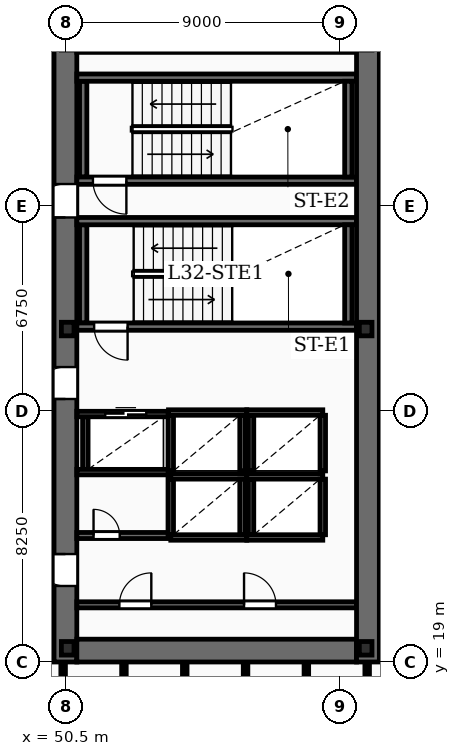
"""IFC4 building model, lengths in metres.
Left out: names, types, materials, properties, quantities, classifications, styles, units other than length and angle.
Written with IfcOpenShell. Run it as: python <this file> out.ifc"""

import sys

from ifc_helpers import new_model, si_unit, direction, frame, frame_2d, origin, origin_2d, place, context, subcontext, project, spatial, rectangle, i_section, extrude, element, fill, save


model = new_model("IFC4")
c1 = context("Model", 3, precision=1e-05, world=origin(), true_north=direction((0.0, 1.0)))
c2 = subcontext(c1, "Body", "Model", "MODEL_VIEW")
j1 = project(units=[si_unit("LENGTHUNIT", "METRE"), si_unit("PLANEANGLEUNIT", "RADIAN")], contexts=[c1])
p1 = place(None, origin())
s1 = spatial("IfcSite", under=j1, at=p1, CompositionType="ELEMENT")
p2 = place(p1, origin())
s2 = spatial("IfcBuilding", under=s1, at=p2, CompositionType="ELEMENT")
p3 = place(p2, frame((0.0, 0.0, 138.25)))
s3 = spatial("IfcBuildingStorey", under=s2, at=p3, CompositionType="ELEMENT", Elevation=138.25)
p4 = place(p3, frame((50.475, 19.0, -0.27), z_axis=(0.0, 0.0, 1.0), x_axis=(0.0, 1.0, 0.0)))
e1 = element("IfcWall", 1, at=p4, inside=s3, PredefinedType="SHEAR", context=c2, shape_type="SweptSolid", body=[
    extrude(rectangle(XDim=20.8, YDim=0.75, at=frame_2d((10.4, 0.0))), origin(), (0.0, 0.0, 1.0), 3.75),
])
p5 = place(p4, frame((2.5, 0.0, 0.27)))
e2 = element("IfcOpeningElement", 2, at=p5, cuts=e1, PredefinedType="OPENING", context=c2, shape_type="SweptSolid", body=[
    extrude(rectangle(XDim=1.05, YDim=2.15, at=frame_2d((0.525, 1.075))), frame((0.0, 0.385, 0.0), z_axis=(0.0, -1.0, 0.0), x_axis=(1.0, 0.0, 0.0)), (0.0, 0.0, 1.0), 0.77),
])
p6 = place(p4, frame((8.65, 0.0, 0.27)))
e3 = element("IfcOpeningElement", 3, at=p6, cuts=e1, PredefinedType="OPENING", context=c2, shape_type="SweptSolid", body=[
    extrude(rectangle(XDim=1.05, YDim=2.15, at=frame_2d((0.525, 1.075))), frame((0.0, 0.385, 0.0), z_axis=(0.0, -1.0, 0.0), x_axis=(1.0, 0.0, 0.0)), (0.0, 0.0, 1.0), 0.77),
])
p7 = place(p4, frame((14.62, 0.0, 0.27)))
e4 = element("IfcOpeningElement", 4, at=p7, cuts=e1, PredefinedType="OPENING", context=c2, shape_type="SweptSolid", body=[
    extrude(rectangle(XDim=1.1, YDim=2.15, at=frame_2d((0.55, 1.075))), frame((0.0, 0.385, 0.0), z_axis=(0.0, -1.0, 0.0), x_axis=(1.0, 0.0, 0.0)), (0.0, 0.0, 1.0), 0.77),
])
p8 = place(p3, frame((60.425, 19.0, -0.27), z_axis=(0.0, 0.0, 1.0), x_axis=(0.0, 1.0, 0.0)))
e5 = element("IfcWall", 5, at=p8, inside=s3, PredefinedType="SHEAR", context=c2, shape_type="SweptSolid", body=[
    extrude(rectangle(XDim=20.8, YDim=0.75, at=frame_2d((10.4, 0.0))), origin(), (0.0, 0.0, 1.0), 3.75),
])
for number, where, z_axis, x_axis in (
    (6, (50.85, 19.375, -0.27), (0.0, 0.0, 1.0), (1.0, 0.0, 0.0)),
    (7, (50.85, 39.425, -0.27), (0.0, 0.0, 1.0), (1.0, 0.0, 0.0)),
):
    element("IfcWall", number, at=place(p3, frame(where, z_axis=z_axis, x_axis=x_axis)), inside=s3, PredefinedType="SHEAR", context=c2, shape_type="SweptSolid", body=[
        extrude(rectangle(XDim=9.2, YDim=0.75, at=frame_2d((4.6, 0.0))), origin(), (0.0, 0.0, 1.0), 3.75),
    ])
for number, where, z_axis, x_axis in (
    (8, (50.55, 19.45, -0.27), (0.0, 0.0, 1.0), (1.0, 0.0, 0.0)),
    (9, (60.35, 19.45, -0.27), (0.0, 0.0, 1.0), (1.0, 0.0, 0.0)),
    (10, (50.55, 29.95, -0.27), (0.0, 0.0, 1.0), (1.0, 0.0, 0.0)),
    (11, (60.35, 29.95, -0.27), (0.0, 0.0, 1.0), (1.0, 0.0, 0.0)),
):
    element("IfcColumn", number, at=place(p3, frame(where, z_axis=z_axis, x_axis=x_axis)), inside=s3, PredefinedType="COLUMN", context=c2, shape_type="SweptSolid", body=[
        extrude(i_section(OverallWidth=0.416, OverallDepth=0.446, WebThickness=0.039, FlangeThickness=0.063, FilletRadius=0.02, at=origin_2d()), origin(), (0.0, 0.0, 1.0), 3.75),
    ])
p9 = place(p3, frame((60.05, 30.03, 0.0), z_axis=(0.0, 0.0, 1.0), x_axis=(-1.0, 0.0, 0.0)))
e12 = element("IfcWall", 12, at=p9, inside=s3, PredefinedType="SOLIDWALL", context=c2, shape_type="SweptSolid", body=[
    extrude(rectangle(XDim=9.2, YDim=0.24, at=frame_2d((4.6, 0.0))), origin(), (0.0, 0.0, 1.0), 3.48),
])
p10 = place(p9, frame((7.53, 0.0, 0.0)))
e13 = element("IfcOpeningElement", 13, at=p10, cuts=e12, PredefinedType="OPENING", context=c2, shape_type="SweptSolid", body=[
    extrude(rectangle(XDim=1.1, YDim=2.15, at=frame_2d((0.55, 1.075))), frame((0.0, 0.13, 0.0), z_axis=(0.0, -1.0, 0.0), x_axis=(1.0, 0.0, 0.0)), (0.0, 0.0, 1.0), 0.26),
])
p11 = place(p3, frame((50.85, 33.5, 0.0), z_axis=(0.0, 0.0, 1.0), x_axis=(1.0, 0.0, 0.0)))
e14 = element("IfcWall", 14, at=p11, inside=s3, PredefinedType="SOLIDWALL", context=c2, shape_type="SweptSolid", body=[
    extrude(rectangle(XDim=9.2, YDim=0.24, at=frame_2d((4.6, 0.0))), origin(), (0.0, 0.0, 1.0), 3.48),
])
for number, where, z_axis, x_axis in (
    (15, (51.06, 30.15, 0.0), (0.0, 0.0, 1.0), (0.0, 1.0, 0.0)),
    (16, (59.78, 30.15, 0.0), (0.0, 0.0, 1.0), (0.0, 1.0, 0.0)),
):
    element("IfcWall", number, at=place(p3, frame(where, z_axis=z_axis, x_axis=x_axis)), inside=s3, PredefinedType="SOLIDWALL", context=c2, shape_type="SweptSolid", body=[
        extrude(rectangle(XDim=3.23, YDim=0.24, at=frame_2d((1.615, 0.0))), origin(), (0.0, 0.0, 1.0), 3.48),
    ])
p12 = place(p3, frame((60.05, 34.83, 0.0), z_axis=(0.0, 0.0, 1.0), x_axis=(-1.0, 0.0, 0.0)))
e17 = element("IfcWall", 17, at=p12, inside=s3, PredefinedType="SOLIDWALL", context=c2, shape_type="SweptSolid", body=[
    extrude(rectangle(XDim=9.2, YDim=0.24, at=frame_2d((4.6, 0.0))), origin(), (0.0, 0.0, 1.0), 3.48),
])
p13 = place(p12, frame((7.57, 0.0, 0.0)))
e18 = element("IfcOpeningElement", 18, at=p13, cuts=e17, PredefinedType="OPENING", context=c2, shape_type="SweptSolid", body=[
    extrude(rectangle(XDim=1.1, YDim=2.15, at=frame_2d((0.55, 1.075))), frame((0.0, 0.13, 0.0), z_axis=(0.0, -1.0, 0.0), x_axis=(1.0, 0.0, 0.0)), (0.0, 0.0, 1.0), 0.26),
])
p14 = place(p3, frame((50.85, 38.22, 0.0), z_axis=(0.0, 0.0, 1.0), x_axis=(1.0, 0.0, 0.0)))
e19 = element("IfcWall", 19, at=p14, inside=s3, PredefinedType="SOLIDWALL", context=c2, shape_type="SweptSolid", body=[
    extrude(rectangle(XDim=9.2, YDim=0.24, at=frame_2d((4.6, 0.0))), origin(), (0.0, 0.0, 1.0), 3.48),
])
for number, where, z_axis, x_axis in (
    (20, (51.06, 34.95, 0.0), (0.0, 0.0, 1.0), (0.0, 1.0, 0.0)),
    (21, (59.78, 34.95, 0.0), (0.0, 0.0, 1.0), (0.0, 1.0, 0.0)),
):
    element("IfcWall", number, at=place(p3, frame(where, z_axis=z_axis, x_axis=x_axis)), inside=s3, PredefinedType="SOLIDWALL", context=c2, shape_type="SweptSolid", body=[
        extrude(rectangle(XDim=3.15, YDim=0.24, at=frame_2d((1.575, 0.0))), origin(), (0.0, 0.0, 1.0), 3.48),
    ])
for number, where, z_axis, x_axis in (
    (22, (53.94, 25.105, 0.0), (0.0, 0.0, 1.0), (1.0, 0.0, 0.0)),
    (23, (53.94, 23.095, 0.0), (0.0, 0.0, 1.0), (1.0, 0.0, 0.0)),
):
    element("IfcWall", number, at=place(p3, frame(where, z_axis=z_axis, x_axis=x_axis)), inside=s3, PredefinedType="SOLIDWALL", context=c2, shape_type="SweptSolid", body=[
        extrude(rectangle(XDim=2.5, YDim=0.18, at=frame_2d((1.25, 0.0))), origin(), (0.0, 0.0, 1.0), 3.48),
    ])
for number, where, z_axis, x_axis in (
    (24, (53.94, 23.185, 0.0), (0.0, 0.0, 1.0), (0.0, 1.0, 0.0)),
    (25, (56.3, 23.185, 0.0), (0.0, 0.0, 1.0), (0.0, 1.0, 0.0)),
):
    element("IfcWall", number, at=place(p3, frame(where, z_axis=z_axis, x_axis=x_axis)), inside=s3, PredefinedType="SOLIDWALL", context=c2, shape_type="SweptSolid", body=[
        extrude(rectangle(XDim=1.83, YDim=0.18, at=frame_2d((0.915, 0.0))), origin(), (0.0, 0.0, 1.0), 3.48),
    ])
for number, where, z_axis, x_axis in (
    (26, (56.44, 25.105, 0.0), (0.0, 0.0, 1.0), (1.0, 0.0, 0.0)),
    (27, (56.44, 23.095, 0.0), (0.0, 0.0, 1.0), (1.0, 0.0, 0.0)),
):
    element("IfcWall", number, at=place(p3, frame(where, z_axis=z_axis, x_axis=x_axis)), inside=s3, PredefinedType="SOLIDWALL", context=c2, shape_type="SweptSolid", body=[
        extrude(rectangle(XDim=2.5, YDim=0.18, at=frame_2d((1.25, 0.0))), origin(), (0.0, 0.0, 1.0), 3.48),
    ])
for number, where, z_axis, x_axis in (
    (28, (56.58, 23.185, 0.0), (0.0, 0.0, 1.0), (0.0, 1.0, 0.0)),
    (29, (58.94, 23.185, 0.0), (0.0, 0.0, 1.0), (0.0, 1.0, 0.0)),
):
    element("IfcWall", number, at=place(p3, frame(where, z_axis=z_axis, x_axis=x_axis)), inside=s3, PredefinedType="SOLIDWALL", context=c2, shape_type="SweptSolid", body=[
        extrude(rectangle(XDim=1.83, YDim=0.18, at=frame_2d((0.915, 0.0))), origin(), (0.0, 0.0, 1.0), 3.48),
    ])
p15 = place(p3, frame((53.865, 27.205, 0.0), z_axis=(0.0, 0.0, 1.0), x_axis=(1.0, 0.0, 0.0)))
e30 = element("IfcWall", 30, at=p15, inside=s3, PredefinedType="SOLIDWALL", context=c2, shape_type="SweptSolid", body=[
    extrude(rectangle(XDim=2.575, YDim=0.18, at=frame_2d((1.288, 0.0))), origin(), (0.0, 0.0, 1.0), 3.48),
])
for number, where, z_axis, x_axis in (
    (31, (53.94, 25.285, 0.0), (0.0, 0.0, 1.0), (0.0, 1.0, 0.0)),
    (32, (56.3, 25.285, 0.0), (0.0, 0.0, 1.0), (0.0, 1.0, 0.0)),
):
    element("IfcWall", number, at=place(p3, frame(where, z_axis=z_axis, x_axis=x_axis)), inside=s3, PredefinedType="SOLIDWALL", context=c2, shape_type="SweptSolid", body=[
        extrude(rectangle(XDim=1.83, YDim=0.18, at=frame_2d((0.915, 0.0))), origin(), (0.0, 0.0, 1.0), 3.48),
    ])
p16 = place(p3, frame((56.44, 27.205, 0.0), z_axis=(0.0, 0.0, 1.0), x_axis=(1.0, 0.0, 0.0)))
e33 = element("IfcWall", 33, at=p16, inside=s3, PredefinedType="SOLIDWALL", context=c2, shape_type="SweptSolid", body=[
    extrude(rectangle(XDim=2.5, YDim=0.18, at=frame_2d((1.25, 0.0))), origin(), (0.0, 0.0, 1.0), 3.48),
])
for number, where, z_axis, x_axis in (
    (34, (56.58, 25.285, 0.0), (0.0, 0.0, 1.0), (0.0, 1.0, 0.0)),
    (35, (58.94, 25.285, 0.0), (0.0, 0.0, 1.0), (0.0, 1.0, 0.0)),
):
    element("IfcWall", number, at=place(p3, frame(where, z_axis=z_axis, x_axis=x_axis)), inside=s3, PredefinedType="SOLIDWALL", context=c2, shape_type="SweptSolid", body=[
        extrude(rectangle(XDim=1.83, YDim=0.18, at=frame_2d((0.915, 0.0))), origin(), (0.0, 0.0, 1.0), 3.48),
    ])
p17 = place(p3, frame((50.85, 27.155, 0.0), z_axis=(0.0, 0.0, 1.0), x_axis=(1.0, 0.0, 0.0)))
e36 = element("IfcWall", 36, at=p17, inside=s3, PredefinedType="SOLIDWALL", context=c2, shape_type="SweptSolid", body=[
    extrude(rectangle(XDim=3.015, YDim=0.18, at=frame_2d((1.507, 0.0))), origin(), (0.0, 0.0, 1.0), 3.48),
])
p18 = place(p17, frame((0.935, 0.0, 0.0)))
e37 = element("IfcOpeningElement", 37, at=p18, cuts=e36, PredefinedType="OPENING", context=c2, shape_type="SweptSolid", body=[
    extrude(rectangle(XDim=1.35, YDim=2.3, at=frame_2d((0.675, 1.15))), frame((0.0, 0.1, 0.0), z_axis=(0.0, -1.0, 0.0), x_axis=(1.0, 0.0, 0.0)), (0.0, 0.0, 1.0), 0.2),
])
p19 = place(p3, frame((50.85, 25.245, 0.0), z_axis=(0.0, 0.0, 1.0), x_axis=(1.0, 0.0, 0.0)))
e38 = element("IfcWall", 38, at=p19, inside=s3, PredefinedType="SOLIDWALL", context=c2, shape_type="SweptSolid", body=[
    extrude(rectangle(XDim=3.015, YDim=0.18, at=frame_2d((1.507, 0.0))), origin(), (0.0, 0.0, 1.0), 3.48),
])
p20 = place(p3, frame((51.13, 25.335, 0.0), z_axis=(0.0, 0.0, 1.0), x_axis=(0.0, 1.0, 0.0)))
e39 = element("IfcWall", 39, at=p20, inside=s3, PredefinedType="SOLIDWALL", context=c2, shape_type="SweptSolid", body=[
    extrude(rectangle(XDim=1.73, YDim=0.18, at=frame_2d((0.865, 0.0))), origin(), (0.0, 0.0, 1.0), 3.48),
])
p21 = place(p3, frame((50.85, 20.88, 0.0), z_axis=(0.0, 0.0, 1.0), x_axis=(1.0, 0.0, 0.0)))
e40 = element("IfcWall", 40, at=p21, inside=s3, PredefinedType="SOLIDWALL", context=c2, shape_type="SweptSolid", body=[
    extrude(rectangle(XDim=9.2, YDim=0.2, at=frame_2d((4.6, 0.0))), origin(), (0.0, 0.0, 1.0), 2.54),
])
p22 = place(p21, frame((1.4, 0.0, 0.0)))
e41 = element("IfcOpeningElement", 41, at=p22, cuts=e40, PredefinedType="OPENING", context=c2, shape_type="SweptSolid", body=[
    extrude(rectangle(XDim=1.05, YDim=2.15, at=frame_2d((0.525, 1.075))), frame((0.0, 0.11, 0.0), z_axis=(0.0, -1.0, 0.0), x_axis=(1.0, 0.0, 0.0)), (0.0, 0.0, 1.0), 0.22),
])
p23 = place(p21, frame((5.5, 0.0, 0.0)))
e42 = element("IfcOpeningElement", 42, at=p23, cuts=e40, PredefinedType="OPENING", context=c2, shape_type="SweptSolid", body=[
    extrude(rectangle(XDim=1.05, YDim=2.15, at=frame_2d((0.525, 1.075))), frame((0.0, 0.11, 0.0), z_axis=(0.0, -1.0, 0.0), x_axis=(1.0, 0.0, 0.0)), (0.0, 0.0, 1.0), 0.22),
])
p24 = place(p3, frame((50.85, 23.16, 0.0), z_axis=(0.0, 0.0, 1.0), x_axis=(1.0, 0.0, 0.0)))
e43 = element("IfcWall", 43, at=p24, inside=s3, PredefinedType="SOLIDWALL", context=c2, shape_type="SweptSolid", body=[
    extrude(rectangle(XDim=3.03, YDim=0.2, at=frame_2d((1.515, 0.0))), origin(), (0.0, 0.0, 1.0), 2.54),
])
p25 = place(p24, frame((0.55, 0.0, 0.0)))
e44 = element("IfcOpeningElement", 44, at=p25, cuts=e43, PredefinedType="OPENING", context=c2, shape_type="SweptSolid", body=[
    extrude(rectangle(XDim=0.86, YDim=2.05, at=frame_2d((0.43, 1.025))), frame((0.0, 0.11, 0.0), z_axis=(0.0, -1.0, 0.0), x_axis=(1.0, 0.0, 0.0)), (0.0, 0.0, 1.0), 0.22),
])
for number, where, z_axis, x_axis in (
    (45, (52.4, 15.4, 0.0), (0.0, 0.0, 1.0), (0.0, 1.0, 0.0)),
    (46, (54.4, 15.4, 0.0), (0.0, 0.0, 1.0), (0.0, 1.0, 0.0)),
    (47, (56.4, 15.4, 0.0), (0.0, 0.0, 1.0), (0.0, 1.0, 0.0)),
    (48, (58.4, 15.4, 0.0), (0.0, 0.0, 1.0), (0.0, 1.0, 0.0)),
    (49, (50.4, 15.4, 0.0), (0.0, 0.0, 1.0), (0.0, 1.0, 0.0)),
    (50, (60.4, 15.4, 0.0), (0.0, 0.0, 1.0), (0.0, 1.0, 0.0)),
):
    element("IfcWall", number, at=place(p3, frame(where, z_axis=z_axis, x_axis=x_axis)), inside=s3, PredefinedType="PARTITIONING", context=c2, shape_type="SweptSolid", body=[
        extrude(rectangle(XDim=3.58, YDim=0.15, at=frame_2d((1.79, 0.0))), origin(), (0.0, 0.0, 1.0), 2.54),
    ])
p26 = place(p3, frame((24.82, 38.42, 0.0), z_axis=(0.0, 0.0, 1.0), x_axis=(1.0, 0.0, 0.0)))
e51 = element("IfcWall", 51, at=p26, inside=s3, PredefinedType="PARTITIONING", context=c2, shape_type="SweptSolid", body=[
    extrude(rectangle(XDim=25.26, YDim=0.16, at=frame_2d((12.63, 0.0))), origin(), (0.0, 0.0, 1.0), 2.54),
])
p27 = place(p26, frame((3.855, 0.0, 0.0)))
e52 = element("IfcOpeningElement", 52, at=p27, cuts=e51, PredefinedType="OPENING", context=c2, shape_type="SweptSolid", body=[
    extrude(rectangle(XDim=0.95, YDim=2.15, at=frame_2d((0.475, 1.075))), frame((0.0, 0.09, 0.0), z_axis=(0.0, -1.0, 0.0), x_axis=(1.0, 0.0, 0.0)), (0.0, 0.0, 1.0), 0.18),
])
p28 = place(p26, frame((13.705, 0.0, 0.0)))
e53 = element("IfcOpeningElement", 53, at=p28, cuts=e51, PredefinedType="OPENING", context=c2, shape_type="SweptSolid", body=[
    extrude(rectangle(XDim=0.95, YDim=2.15, at=frame_2d((0.475, 1.075))), frame((0.0, 0.09, 0.0), z_axis=(0.0, -1.0, 0.0), x_axis=(1.0, 0.0, 0.0)), (0.0, 0.0, 1.0), 0.18),
])
p29 = place(p26, frame((21.33, 0.0, 0.0)))
e54 = element("IfcOpeningElement", 54, at=p29, cuts=e51, PredefinedType="OPENING", context=c2, shape_type="SweptSolid", body=[
    extrude(rectangle(XDim=0.95, YDim=2.15, at=frame_2d((0.475, 1.075))), frame((0.0, 0.09, 0.0), z_axis=(0.0, -1.0, 0.0), x_axis=(1.0, 0.0, 0.0)), (0.0, 0.0, 1.0), 0.18),
])
p30 = place(p5, origin())
e55 = element("IfcDoor", 55, at=p30, inside=s3, OperationType="SINGLE_SWING_RIGHT", PredefinedType="DOOR", context=c2, shape_type="SweptSolid", body=[
    extrude(rectangle(XDim=1.05, YDim=2.15, at=frame_2d((0.525, 1.075))), frame((0.0, 0.025, 0.0), z_axis=(0.0, -1.0, 0.0), x_axis=(1.0, 0.0, 0.0)), (0.0, 0.0, 1.0), 0.05),
])
fill(e2, e55)
p31 = place(p6, origin())
e56 = element("IfcDoor", 56, at=p31, inside=s3, OperationType="SINGLE_SWING_LEFT", PredefinedType="DOOR", context=c2, shape_type="SweptSolid", body=[
    extrude(rectangle(XDim=1.05, YDim=2.15, at=frame_2d((0.525, 1.075))), frame((0.0, 0.025, 0.0), z_axis=(0.0, -1.0, 0.0), x_axis=(1.0, 0.0, 0.0)), (0.0, 0.0, 1.0), 0.05),
])
fill(e3, e56)
p32 = place(p7, origin())
e57 = element("IfcDoor", 57, at=p32, inside=s3, OperationType="SINGLE_SWING_LEFT", PredefinedType="DOOR", context=c2, shape_type="SweptSolid", body=[
    extrude(rectangle(XDim=1.1, YDim=2.15, at=frame_2d((0.55, 1.075))), frame((0.0, 0.025, 0.0), z_axis=(0.0, -1.0, 0.0), x_axis=(1.0, 0.0, 0.0)), (0.0, 0.0, 1.0), 0.05),
])
fill(e4, e57)
p33 = place(p10, origin())
e58 = element("IfcDoor", 58, at=p33, inside=s3, OperationType="SINGLE_SWING_LEFT", PredefinedType="DOOR", context=c2, shape_type="SweptSolid", body=[
    extrude(rectangle(XDim=1.1, YDim=2.15, at=frame_2d((0.55, 1.075))), frame((0.0, 0.025, 0.0), z_axis=(0.0, -1.0, 0.0), x_axis=(1.0, 0.0, 0.0)), (0.0, 0.0, 1.0), 0.05),
])
fill(e13, e58)
p34 = place(p13, origin())
e59 = element("IfcDoor", 59, at=p34, inside=s3, OperationType="SINGLE_SWING_LEFT", PredefinedType="DOOR", context=c2, shape_type="SweptSolid", body=[
    extrude(rectangle(XDim=1.1, YDim=2.15, at=frame_2d((0.55, 1.075))), frame((0.0, 0.025, 0.0), z_axis=(0.0, -1.0, 0.0), x_axis=(1.0, 0.0, 0.0)), (0.0, 0.0, 1.0), 0.05),
])
fill(e18, e59)
p35 = place(p18, origin())
e60 = element("IfcDoor", 60, at=p35, inside=s3, OperationType="DOUBLE_DOOR_SLIDING", PredefinedType="DOOR", context=c2, shape_type="SweptSolid", body=[
    extrude(rectangle(XDim=1.35, YDim=2.3, at=frame_2d((0.675, 1.15))), frame((0.0, 0.025, 0.0), z_axis=(0.0, -1.0, 0.0), x_axis=(1.0, 0.0, 0.0)), (0.0, 0.0, 1.0), 0.05),
])
fill(e37, e60)
p36 = place(p22, origin())
e61 = element("IfcDoor", 61, at=p36, inside=s3, OperationType="SINGLE_SWING_RIGHT", PredefinedType="DOOR", context=c2, shape_type="SweptSolid", body=[
    extrude(rectangle(XDim=1.05, YDim=2.15, at=frame_2d((0.525, 1.075))), frame((0.0, 0.025, 0.0), z_axis=(0.0, -1.0, 0.0), x_axis=(1.0, 0.0, 0.0)), (0.0, 0.0, 1.0), 0.05),
])
fill(e41, e61)
p37 = place(p23, origin())
e62 = element("IfcDoor", 62, at=p37, inside=s3, OperationType="SINGLE_SWING_LEFT", PredefinedType="DOOR", context=c2, shape_type="SweptSolid", body=[
    extrude(rectangle(XDim=1.05, YDim=2.15, at=frame_2d((0.525, 1.075))), frame((0.0, 0.025, 0.0), z_axis=(0.0, -1.0, 0.0), x_axis=(1.0, 0.0, 0.0)), (0.0, 0.0, 1.0), 0.05),
])
fill(e42, e62)
p38 = place(p25, origin())
e63 = element("IfcDoor", 63, at=p38, inside=s3, OperationType="SINGLE_SWING_LEFT", PredefinedType="DOOR", context=c2, shape_type="SweptSolid", body=[
    extrude(rectangle(XDim=0.86, YDim=2.05, at=frame_2d((0.43, 1.025))), frame((0.0, 0.025, 0.0), z_axis=(0.0, -1.0, 0.0), x_axis=(1.0, 0.0, 0.0)), (0.0, 0.0, 1.0), 0.05),
])
fill(e44, e63)
save(model, sys.argv[1])
